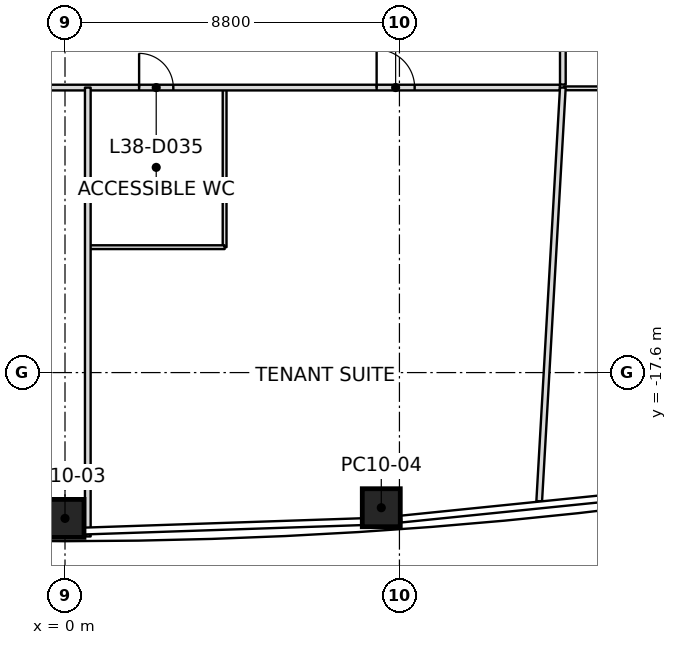
"""IFC4 building model, lengths in metres.
Left out: names, types, materials, properties, quantities, classifications, styles, units other than length and angle.
Written with IfcOpenShell. Run it as: python <this file> out.ifc"""

import sys

from ifc_helpers import new_model, si_unit, direction, frame, frame_2d, origin, origin_2d, place, context, subcontext, project, spatial, rectangle, extrude, element, fill, save


model = new_model("IFC4")
c1 = context("Model", 3, precision=1e-05, world=origin(), true_north=direction((0.0, 1.0)))
c2 = subcontext(c1, "Body", "Model", "MODEL_VIEW")
j1 = project(units=[si_unit("LENGTHUNIT", "METRE"), si_unit("PLANEANGLEUNIT", "RADIAN")], contexts=[c1])
p1 = place(None, origin())
s1 = spatial("IfcSite", under=j1, at=p1, CompositionType="ELEMENT")
p2 = place(p1, origin())
s2 = spatial("IfcBuilding", under=s1, at=p2, CompositionType="ELEMENT")
p3 = place(p2, frame((0.0, 0.0, 173.8)))
s3 = spatial("IfcBuildingStorey", under=s2, at=p3, CompositionType="ELEMENT", Elevation=173.8)
p4 = place(p3, frame((0.0, -21.437, 0.0), z_axis=(0.0, 0.01141283087, 0.999934871525), x_axis=(1.0, 0.0, 0.0)))
e1 = element("IfcColumn", 1, at=p4, inside=s3, PredefinedType="COLUMN", context=c2, shape_type="SweptSolid", body=[
    extrude(rectangle(XDim=1.0, YDim=1.0, at=origin_2d()), origin(), (0.0, 0.0, 1.0), 4.0),
])
p5 = place(p3, frame((8.323, -21.156, 0.0), z_axis=(-0.008849193104, 0.011229320904, 0.999897791843), x_axis=(0.997684103914, 0.067537291309, 0.00807112631)))
e2 = element("IfcColumn", 2, at=p5, inside=s3, PredefinedType="COLUMN", context=c2, shape_type="SweptSolid", body=[
    extrude(rectangle(XDim=1.0, YDim=1.0, at=origin_2d()), origin(), (0.0, 0.0, 1.0), 4.0),
])
p6 = place(p3, frame((0.6, -10.1, 0.0), z_axis=(0.0, 0.0, 1.0), x_axis=(0.0, -1.0, 0.0)))
e3 = element("IfcWall", 3, at=p6, inside=s3, PredefinedType="PARTITIONING", context=c2, shape_type="SweptSolid", body=[
    extrude(rectangle(XDim=11.812, YDim=0.15, at=frame_2d((5.906, 0.0))), origin(), (0.0, 0.0, 1.0), 3.234),
])
p7 = place(p3, frame((13.1, -10.1, 0.0), z_axis=(0.0, 0.0, 1.0), x_axis=(-0.057075935192, -0.9983698401, 0.0)))
e4 = element("IfcWall", 4, at=p7, inside=s3, PredefinedType="PARTITIONING", context=c2, shape_type="SweptSolid", body=[
    extrude(rectangle(XDim=10.903, YDim=0.15, at=frame_2d((5.452, 0.0))), origin(), (0.0, 0.0, 1.0), 3.234),
])
p8 = place(p3, frame((-13.02, -10.1, 0.0), z_axis=(0.0, 0.0, 1.0), x_axis=(1.0, 0.0, 0.0)))
e5 = element("IfcWall", 5, at=p8, inside=s3, PredefinedType="PARTITIONING", context=c2, shape_type="SweptSolid", body=[
    extrude(rectangle(XDim=26.04, YDim=0.15, at=frame_2d((13.02, 0.0))), origin(), (0.0, 0.0, 1.0), 3.317),
])
p9 = place(p8, frame((1.57, 0.0, 0.0)))
e6 = element("IfcOpeningElement", 6, at=p9, cuts=e5, PredefinedType="OPENING", context=c2, shape_type="SweptSolid", body=[
    extrude(rectangle(XDim=0.9, YDim=2.1, at=frame_2d((0.45, 1.05))), frame((0.0, 0.075, 0.0), z_axis=(0.0, -1.0, 0.0), x_axis=(1.0, 0.0, 0.0)), (0.0, 0.0, 1.0), 0.15),
])
p10 = place(p8, frame((8.42, 0.0, 0.0)))
e7 = element("IfcOpeningElement", 7, at=p10, cuts=e5, PredefinedType="OPENING", context=c2, shape_type="SweptSolid", body=[
    extrude(rectangle(XDim=1.0, YDim=2.1, at=frame_2d((0.5, 1.05))), frame((0.0, 0.075, 0.0), z_axis=(0.0, -1.0, 0.0), x_axis=(1.0, 0.0, 0.0)), (0.0, 0.0, 1.0), 0.15),
])
p11 = place(p8, frame((14.97, 0.0, 0.0)))
e8 = element("IfcOpeningElement", 8, at=p11, cuts=e5, PredefinedType="OPENING", context=c2, shape_type="SweptSolid", body=[
    extrude(rectangle(XDim=0.9, YDim=2.1, at=frame_2d((0.45, 1.05))), frame((0.0, 0.075, 0.0), z_axis=(0.0, -1.0, 0.0), x_axis=(1.0, 0.0, 0.0)), (0.0, 0.0, 1.0), 0.15),
])
p12 = place(p8, frame((21.22, 0.0, 0.0)))
e9 = element("IfcOpeningElement", 9, at=p12, cuts=e5, PredefinedType="OPENING", context=c2, shape_type="SweptSolid", body=[
    extrude(rectangle(XDim=1.0, YDim=2.1, at=frame_2d((0.5, 1.05))), frame((0.0, 0.075, 0.0), z_axis=(0.0, -1.0, 0.0), x_axis=(1.0, 0.0, 0.0)), (0.0, 0.0, 1.0), 0.15),
])
p13 = place(p3, frame((13.1, -10.02, 0.0), z_axis=(0.0, 0.0, 1.0), x_axis=(0.0, 1.0, 0.0)))
e10 = element("IfcWall", 10, at=p13, inside=s3, PredefinedType="PARTITIONING", context=c2, shape_type="SweptSolid", body=[
    extrude(rectangle(XDim=20.04, YDim=0.15, at=frame_2d((10.02, 0.0))), origin(), (0.0, 0.0, 1.0), 3.166),
])
p14 = place(p13, frame((14.87, 0.0, 0.0)))
e11 = element("IfcOpeningElement", 11, at=p14, cuts=e10, PredefinedType="OPENING", context=c2, shape_type="SweptSolid", body=[
    extrude(rectangle(XDim=1.0, YDim=2.1, at=frame_2d((0.5, 1.05))), frame((0.0, 0.075, 0.0), z_axis=(0.0, -1.0, 0.0), x_axis=(1.0, 0.0, 0.0)), (0.0, 0.0, 1.0), 0.15),
])
p15 = place(p13, frame((1.95, 0.0, 0.0)))
e12 = element("IfcOpeningElement", 12, at=p15, cuts=e10, PredefinedType="OPENING", context=c2, shape_type="SweptSolid", body=[
    extrude(rectangle(XDim=0.9, YDim=2.1, at=frame_2d((0.45, 1.05))), frame((0.0, 0.075, 0.0), z_axis=(0.0, -1.0, 0.0), x_axis=(1.0, 0.0, 0.0)), (0.0, 0.0, 1.0), 0.15),
])
p16 = place(p13, frame((7.31, 0.0, 0.0)))
e13 = element("IfcOpeningElement", 13, at=p16, cuts=e10, PredefinedType="OPENING", context=c2, shape_type="SweptSolid", body=[
    extrude(rectangle(XDim=1.0, YDim=2.1, at=frame_2d((0.5, 1.05))), frame((0.0, 0.075, 0.0), z_axis=(0.0, -1.0, 0.0), x_axis=(1.0, 0.0, 0.0)), (0.0, 0.0, 1.0), 0.15),
])
p17 = place(p3, frame((4.2, -10.13, 0.0), z_axis=(0.0, 0.0, 1.0), x_axis=(0.0, -1.0, 0.0)))
e14 = element("IfcWall", 14, at=p17, inside=s3, PredefinedType="PARTITIONING", context=c2, shape_type="SweptSolid", body=[
    extrude(rectangle(XDim=4.17, YDim=0.1, at=frame_2d((2.085, 0.0))), origin(), (0.0, 0.0, 1.0), 3.45),
])
p18 = place(p3, frame((4.2, -14.3, 0.0), z_axis=(0.0, 0.0, 1.0), x_axis=(-1.0, 0.0, 0.0)))
e15 = element("IfcWall", 15, at=p18, inside=s3, PredefinedType="PARTITIONING", context=c2, shape_type="SweptSolid", body=[
    extrude(rectangle(XDim=3.57, YDim=0.1, at=frame_2d((1.785, 0.0))), origin(), (0.0, 0.0, 1.0), 3.317),
])
p19 = place(p3, frame((19.1, -10.12, 0.0), z_axis=(0.0, 0.0, 1.0), x_axis=(-1.0, 0.0, 0.0)))
e16 = element("IfcWall", 16, at=p19, inside=s3, PredefinedType="PARTITIONING", context=c2, shape_type="SweptSolid", body=[
    extrude(rectangle(XDim=5.97, YDim=0.1, at=frame_2d((2.985, 0.0))), origin(), (0.0, 0.0, 1.0), 3.166),
])
p20 = place(p11, origin())
e17 = element("IfcDoor", 17, at=p20, inside=s3, OperationType="SINGLE_SWING_LEFT", PredefinedType="DOOR", context=c2, shape_type="SweptSolid", body=[
    extrude(rectangle(XDim=0.9, YDim=2.1, at=frame_2d((0.45, 1.05))), frame((0.0, 0.025, 0.0), z_axis=(0.0, -1.0, 0.0), x_axis=(1.0, 0.0, 0.0)), (0.0, 0.0, 1.0), 0.05),
])
fill(e8, e17)
p21 = place(p12, origin())
e18 = element("IfcDoor", 18, at=p21, inside=s3, OperationType="SINGLE_SWING_LEFT", PredefinedType="DOOR", context=c2, shape_type="SweptSolid", body=[
    extrude(rectangle(XDim=1.0, YDim=2.1, at=frame_2d((0.5, 1.05))), frame((0.0, 0.025, 0.0), z_axis=(0.0, -1.0, 0.0), x_axis=(1.0, 0.0, 0.0)), (0.0, 0.0, 1.0), 0.05),
])
fill(e9, e18)
save(model, sys.argv[1])
